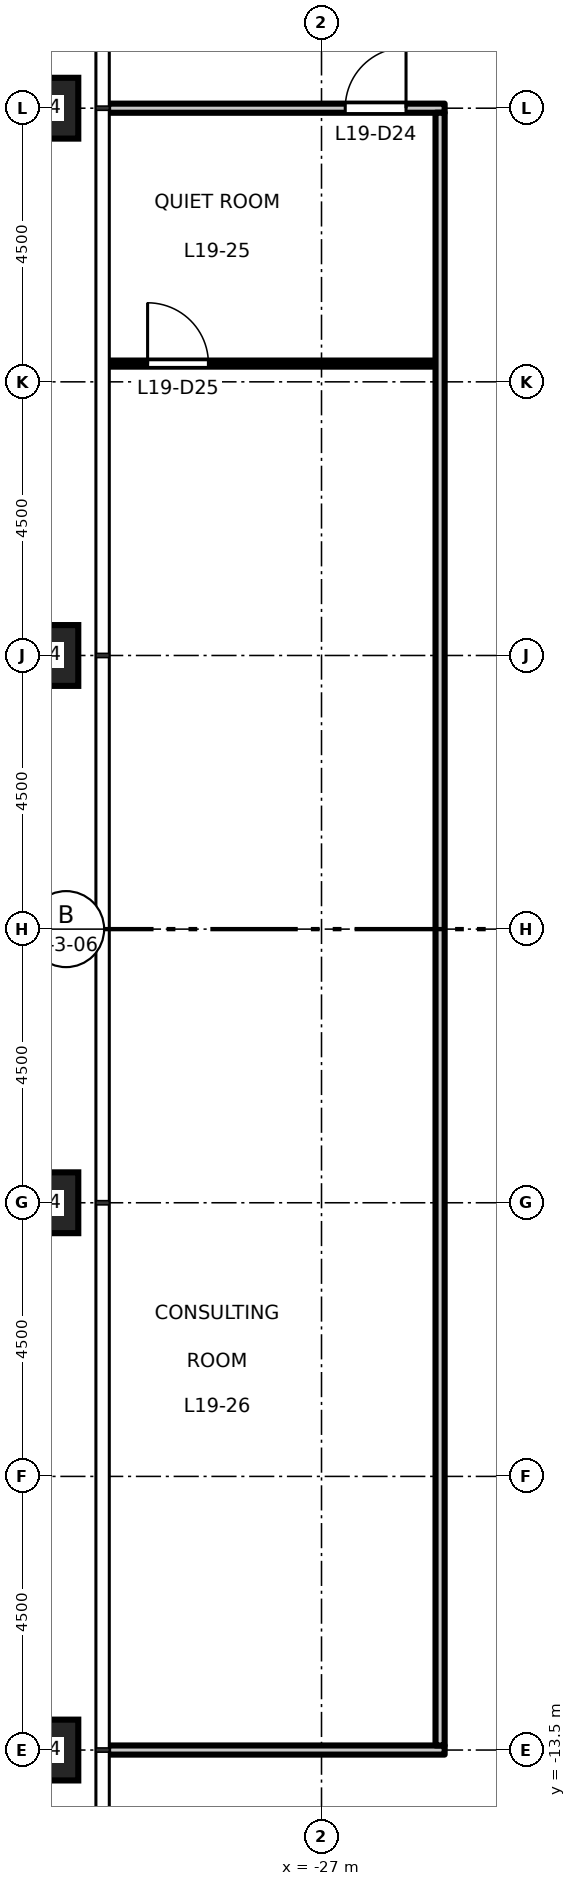
"""IFC4 building model, lengths in metres.
Left out: names, types, materials, properties, quantities, classifications, styles, units other than length and angle.
Written with IfcOpenShell. Run it as: python <this file> out.ifc"""

import sys

from ifc_helpers import new_model, si_unit, direction, frame, frame_2d, origin, origin_2d, place, context, subcontext, project, spatial, rectangle, hollow_rectangle, extrude, element, fill, save


model = new_model("IFC4")
c1 = context("Model", 3, precision=1e-05, world=origin(), true_north=direction((0.0, 1.0)))
c2 = subcontext(c1, "Body", "Model", "MODEL_VIEW")
j1 = project(units=[si_unit("LENGTHUNIT", "METRE"), si_unit("PLANEANGLEUNIT", "RADIAN")], contexts=[c1])
p1 = place(None, origin())
s1 = spatial("IfcSite", under=j1, at=p1, CompositionType="ELEMENT")
p2 = place(p1, origin())
s2 = spatial("IfcBuilding", under=s1, at=p2, CompositionType="ELEMENT")
p3 = place(p2, frame((0.0, 0.0, 89.7)))
s3 = spatial("IfcBuildingStorey", under=s2, at=p3, CompositionType="ELEMENT", Elevation=89.7)
for number, where, z_axis, x_axis in (
    (1, (-31.5, 13.5, 0.0), (0.0, 0.0, 1.0), (1.0, 0.0, 0.0)),
    (2, (-31.5, 4.5, 0.0), (0.0, 0.0, 1.0), (1.0, 0.0, 0.0)),
    (3, (-31.5, -4.5, 0.0), (0.0, 0.0, 1.0), (1.0, 0.0, 0.0)),
    (4, (-31.5, -13.5, 0.0), (0.0, 0.0, 1.0), (1.0, 0.0, 0.0)),
):
    element("IfcColumn", number, at=place(p3, frame(where, z_axis=z_axis, x_axis=x_axis)), inside=s3, PredefinedType="COLUMN", context=c2, shape_type="SweptSolid", body=[
        extrude(hollow_rectangle(XDim=1.0, YDim=1.0, WallThickness=0.06, at=origin_2d()), origin(), (0.0, 0.0, 1.0), 4.5),
    ])
p4 = place(p3, frame((-30.51, -13.5, 0.0), z_axis=(0.0, 0.0, 1.0), x_axis=(1.0, 0.0, 0.0)))
e5 = element("IfcWall", 5, at=p4, inside=s3, PredefinedType="PARTITIONING", context=c2, shape_type="SweptSolid", body=[
    extrude(rectangle(XDim=5.535, YDim=0.15, at=frame_2d((2.768, 0.0))), origin(), (0.0, 0.0, 1.0), 3.3),
])
p5 = place(p3, frame((-30.51, 9.3, 0.0), z_axis=(0.0, 0.0, 1.0), x_axis=(1.0, 0.0, 0.0)))
e6 = element("IfcWall", 6, at=p5, inside=s3, PredefinedType="PARTITIONING", context=c2, shape_type="SweptSolid", body=[
    extrude(rectangle(XDim=5.385, YDim=0.1, at=frame_2d((2.692, 0.0))), origin(), (0.0, 0.0, 1.0), 4.3),
])
p6 = place(p5, frame((0.65, 0.0, 0.0)))
e7 = element("IfcOpeningElement", 7, at=p6, cuts=e6, PredefinedType="OPENING", context=c2, shape_type="SweptSolid", body=[
    extrude(rectangle(XDim=1.0, YDim=2.1, at=frame_2d((0.5, 1.05))), frame((0.0, 0.06, 0.0), z_axis=(0.0, -1.0, 0.0), x_axis=(1.0, 0.0, 0.0)), (0.0, 0.0, 1.0), 0.12),
])
p7 = place(p3, frame((-30.51, 13.5, 0.0), z_axis=(0.0, 0.0, 1.0), x_axis=(1.0, 0.0, 0.0)))
e8 = element("IfcWall", 8, at=p7, inside=s3, PredefinedType="PARTITIONING", context=c2, shape_type="SweptSolid", body=[
    extrude(rectangle(XDim=5.535, YDim=0.15, at=frame_2d((2.768, 0.0))), origin(), (0.0, 0.0, 1.0), 3.3),
])
p8 = place(p7, frame((3.9, 0.0, 0.0)))
e9 = element("IfcOpeningElement", 9, at=p8, cuts=e8, PredefinedType="OPENING", context=c2, shape_type="SweptSolid", body=[
    extrude(rectangle(XDim=1.0, YDim=2.1, at=frame_2d((0.5, 1.05))), frame((0.0, 0.085, 0.0), z_axis=(0.0, -1.0, 0.0), x_axis=(1.0, 0.0, 0.0)), (0.0, 0.0, 1.0), 0.17),
])
p9 = place(p3, frame((-25.05, -13.425, 0.0), z_axis=(0.0, 0.0, 1.0), x_axis=(0.0, 1.0, 0.0)))
e10 = element("IfcWall", 10, at=p9, inside=s3, PredefinedType="PARTITIONING", context=c2, shape_type="SweptSolid", body=[
    extrude(rectangle(XDim=26.85, YDim=0.15, at=frame_2d((13.425, 0.0))), origin(), (0.0, 0.0, 1.0), 4.3),
])
p10 = place(p8, origin())
e11 = element("IfcDoor", 11, at=p10, inside=s3, OperationType="SINGLE_SWING_RIGHT", PredefinedType="DOOR", context=c2, shape_type="SweptSolid", body=[
    extrude(rectangle(XDim=1.0, YDim=2.1, at=frame_2d((0.5, 1.05))), frame((0.0, 0.025, 0.0), z_axis=(0.0, -1.0, 0.0), x_axis=(1.0, 0.0, 0.0)), (0.0, 0.0, 1.0), 0.05),
])
fill(e9, e11)
p11 = place(p6, origin())
e12 = element("IfcDoor", 12, at=p11, inside=s3, OperationType="SINGLE_SWING_LEFT", PredefinedType="DOOR", context=c2, shape_type="SweptSolid", body=[
    extrude(rectangle(XDim=1.0, YDim=2.1, at=frame_2d((0.5, 1.05))), frame((0.0, 0.025, 0.0), z_axis=(0.0, -1.0, 0.0), x_axis=(1.0, 0.0, 0.0)), (0.0, 0.0, 1.0), 0.05),
])
fill(e7, e12)
save(model, sys.argv[1])
